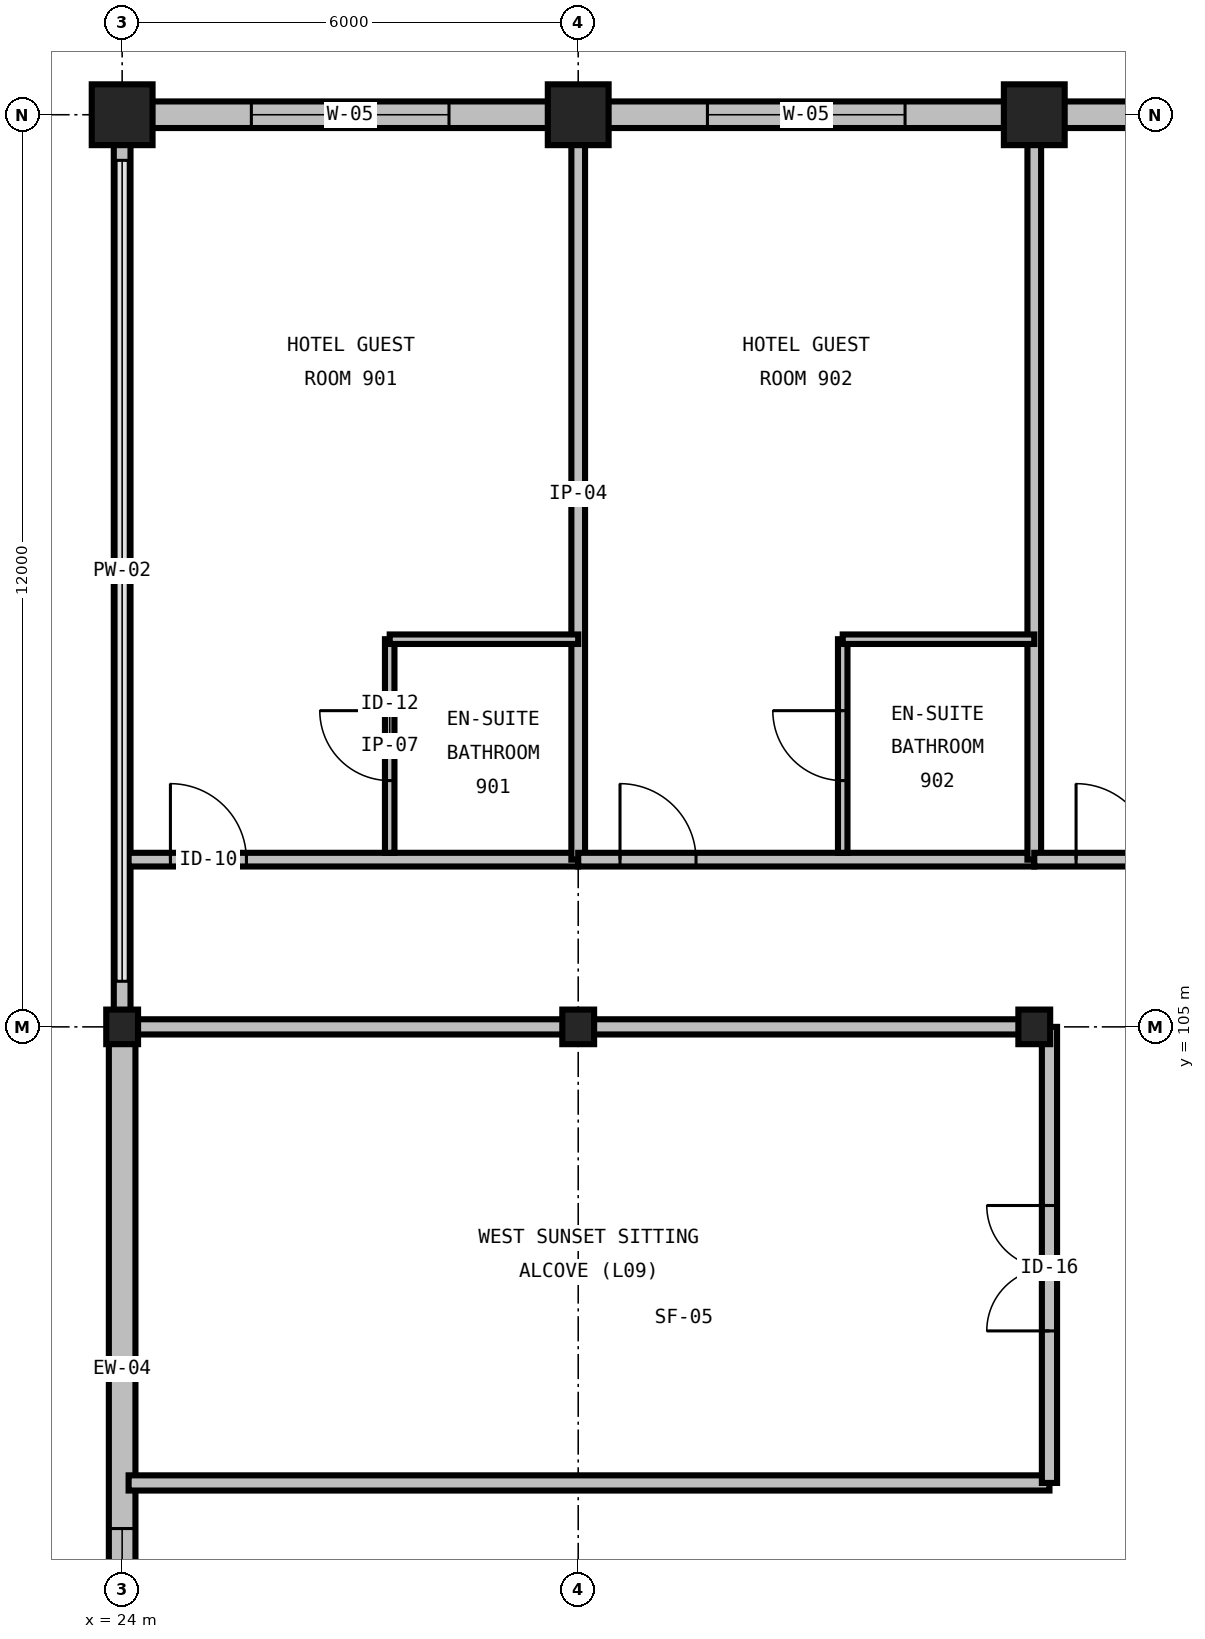
"""IFC4 building model, lengths in metres.
Left out: names, types, materials, properties, quantities, classifications, styles, units other than length and angle.
Written with IfcOpenShell. Run it as: python <this file> out.ifc"""

import sys

from ifc_helpers import new_model, si_unit, direction, frame, frame_2d, origin, origin_2d, place, context, subcontext, project, spatial, rectangle, i_section, extrude, element, fill, save


model = new_model("IFC4")
c1 = context("Model", 3, precision=1e-05, world=origin(), true_north=direction((0.0, 1.0)))
c2 = subcontext(c1, "Body", "Model", "MODEL_VIEW")
j1 = project(units=[si_unit("LENGTHUNIT", "METRE"), si_unit("PLANEANGLEUNIT", "RADIAN")], contexts=[c1])
p1 = place(None, origin())
s1 = spatial("IfcSite", under=j1, at=p1, CompositionType="ELEMENT")
p2 = place(p1, origin())
s2 = spatial("IfcBuilding", under=s1, at=p2, CompositionType="ELEMENT")
p3 = place(p2, frame((0.0, 0.0, 42.0)))
s3 = spatial("IfcBuildingStorey", under=s2, at=p3, CompositionType="ELEMENT", Elevation=42.0)
p4 = place(p3, frame((24.0, 105.0, 0.0), z_axis=(0.0, 0.0, 1.0), x_axis=(1.0, 0.0, 0.0)))
e1 = element("IfcColumn", 1, at=p4, inside=s3, PredefinedType="COLUMN", context=c2, shape_type="SweptSolid", body=[
    extrude(i_section(OverallWidth=0.419, OverallDepth=0.455, WebThickness=0.042, FlangeThickness=0.068, FilletRadius=0.031, at=origin_2d()), origin(), (0.0, 0.0, 1.0), 3.6),
])
p5 = place(p3, frame((24.0, 117.0, 0.0), z_axis=(0.0, 0.0, 1.0), x_axis=(1.0, 0.0, 0.0)))
e2 = element("IfcColumn", 2, at=p5, inside=s3, PredefinedType="COLUMN", context=c2, shape_type="SweptSolid", body=[
    extrude(rectangle(XDim=0.8, YDim=0.8, at=origin_2d()), origin(), (0.0, 0.0, 1.0), 3.6),
])
p6 = place(p3, frame((30.0, 105.0, 0.0), z_axis=(0.0, 0.0, 1.0), x_axis=(1.0, 0.0, 0.0)))
e3 = element("IfcColumn", 3, at=p6, inside=s3, PredefinedType="COLUMN", context=c2, shape_type="SweptSolid", body=[
    extrude(i_section(OverallWidth=0.419, OverallDepth=0.455, WebThickness=0.042, FlangeThickness=0.068, FilletRadius=0.031, at=origin_2d()), origin(), (0.0, 0.0, 1.0), 3.6),
])
p7 = place(p3, frame((30.0, 117.0, 0.0), z_axis=(0.0, 0.0, 1.0), x_axis=(1.0, 0.0, 0.0)))
e4 = element("IfcColumn", 4, at=p7, inside=s3, PredefinedType="COLUMN", context=c2, shape_type="SweptSolid", body=[
    extrude(rectangle(XDim=0.8, YDim=0.8, at=origin_2d()), origin(), (0.0, 0.0, 1.0), 3.6),
])
p8 = place(p3, frame((36.0, 105.0, 0.0), z_axis=(0.0, 0.0, 1.0), x_axis=(1.0, 0.0, 0.0)))
e5 = element("IfcColumn", 5, at=p8, inside=s3, PredefinedType="COLUMN", context=c2, shape_type="SweptSolid", body=[
    extrude(i_section(OverallWidth=0.419, OverallDepth=0.455, WebThickness=0.042, FlangeThickness=0.068, FilletRadius=0.031, at=origin_2d()), origin(), (0.0, 0.0, 1.0), 3.6),
])
p9 = place(p3, frame((36.0, 117.0, 0.0), z_axis=(0.0, 0.0, 1.0), x_axis=(1.0, 0.0, 0.0)))
e6 = element("IfcColumn", 6, at=p9, inside=s3, PredefinedType="COLUMN", context=c2, shape_type="SweptSolid", body=[
    extrude(rectangle(XDim=0.8, YDim=0.8, at=origin_2d()), origin(), (0.0, 0.0, 1.0), 3.6),
])
p10 = place(p3, frame((30.0, 117.0, 0.0), z_axis=(0.0, 0.0, 1.0), x_axis=(-1.0, 0.0, 0.0)))
e7 = element("IfcWall", 7, at=p10, inside=s3, PredefinedType="STANDARD", context=c2, shape_type="SweptSolid", body=[
    extrude(rectangle(XDim=6.0, YDim=0.35, at=frame_2d((3.0, 0.0))), origin(), (0.0, 0.0, 1.0), 2.486),
])
p11 = place(p10, frame((1.7, 0.0, 0.72)))
e8 = element("IfcOpeningElement", 8, at=p11, cuts=e7, PredefinedType="OPENING", context=c2, shape_type="SweptSolid", body=[
    extrude(rectangle(XDim=2.6, YDim=1.69, at=frame_2d((1.3, 0.845))), frame((0.0, 0.19, 0.0), z_axis=(0.0, -1.0, 0.0), x_axis=(1.0, 0.0, 0.0)), (0.0, 0.0, 1.0), 0.38),
])
p12 = place(p3, frame((36.0, 117.0, 0.0), z_axis=(0.0, 0.0, 1.0), x_axis=(-1.0, 0.0, 0.0)))
e9 = element("IfcWall", 9, at=p12, inside=s3, PredefinedType="STANDARD", context=c2, shape_type="SweptSolid", body=[
    extrude(rectangle(XDim=6.0, YDim=0.35, at=frame_2d((3.0, 0.0))), origin(), (0.0, 0.0, 1.0), 2.486),
])
p13 = place(p12, frame((1.7, 0.0, 0.72)))
e10 = element("IfcOpeningElement", 10, at=p13, cuts=e9, PredefinedType="OPENING", context=c2, shape_type="SweptSolid", body=[
    extrude(rectangle(XDim=2.6, YDim=1.69, at=frame_2d((1.3, 0.845))), frame((0.0, 0.19, 0.0), z_axis=(0.0, -1.0, 0.0), x_axis=(1.0, 0.0, 0.0)), (0.0, 0.0, 1.0), 0.38),
])
p14 = place(p3, frame((42.0, 117.0, 0.0), z_axis=(0.0, 0.0, 1.0), x_axis=(-1.0, 0.0, 0.0)))
e11 = element("IfcWall", 11, at=p14, inside=s3, PredefinedType="STANDARD", context=c2, shape_type="SweptSolid", body=[
    extrude(rectangle(XDim=6.0, YDim=0.35, at=frame_2d((3.0, 0.0))), origin(), (0.0, 0.0, 1.0), 2.486),
])
p15 = place(p14, frame((1.7, 0.0, 0.72)))
e12 = element("IfcOpeningElement", 12, at=p15, cuts=e11, PredefinedType="OPENING", context=c2, shape_type="SweptSolid", body=[
    extrude(rectangle(XDim=2.6, YDim=1.69, at=frame_2d((1.3, 0.845))), frame((0.0, 0.19, 0.0), z_axis=(0.0, -1.0, 0.0), x_axis=(1.0, 0.0, 0.0)), (0.0, 0.0, 1.0), 0.38),
])
p16 = place(p3, frame((24.0, 105.0, 0.0), z_axis=(0.0, 0.0, 1.0), x_axis=(0.0, -1.0, 0.0)))
e13 = element("IfcWall", 13, at=p16, inside=s3, PredefinedType="STANDARD", context=c2, shape_type="SweptSolid", body=[
    extrude(rectangle(XDim=9.0, YDim=0.35, at=frame_2d((4.5, 0.0))), origin(), (0.0, 0.0, 1.0), 2.981),
])
p17 = place(p16, frame((6.6, 0.0, 0.85)))
e14 = element("IfcOpeningElement", 14, at=p17, cuts=e13, PredefinedType="OPENING", context=c2, shape_type="SweptSolid", body=[
    extrude(rectangle(XDim=1.8, YDim=1.5, at=frame_2d((0.9, 0.75))), frame((0.0, 0.19, 0.0), z_axis=(0.0, -1.0, 0.0), x_axis=(1.0, 0.0, 0.0)), (0.0, 0.0, 1.0), 0.38),
])
p18 = place(p3, frame((24.0, 117.0, 0.0), z_axis=(0.0, 0.0, 1.0), x_axis=(0.0, -1.0, 0.0)))
e15 = element("IfcWall", 15, at=p18, inside=s3, PredefinedType="PARAPET", context=c2, shape_type="SweptSolid", body=[
    extrude(rectangle(XDim=12.0, YDim=0.22, at=frame_2d((6.0, 0.0))), origin(), (0.0, 0.0, 1.0), 0.2),
])
p19 = place(p3, frame((24.085, 107.2, 0.0), z_axis=(0.0, 0.0, 1.0), x_axis=(1.0, 0.0, 0.0)))
e16 = element("IfcWall", 16, at=p19, inside=s3, PredefinedType="PARTITIONING", context=c2, shape_type="SweptSolid", body=[
    extrude(rectangle(XDim=5.915, YDim=0.18, at=frame_2d((2.957, 0.0))), origin(), (0.0, 0.0, 1.0), 3.29),
])
p20 = place(p19, frame((0.55, 0.0, 0.0)))
e17 = element("IfcOpeningElement", 17, at=p20, cuts=e16, PredefinedType="OPENING", context=c2, shape_type="SweptSolid", body=[
    extrude(rectangle(XDim=1.0, YDim=2.15, at=frame_2d((0.5, 1.075))), frame((0.0, 0.105, 0.0), z_axis=(0.0, -1.0, 0.0), x_axis=(1.0, 0.0, 0.0)), (0.0, 0.0, 1.0), 0.21),
])
p21 = place(p3, frame((30.0, 107.2, 0.0), z_axis=(0.0, 0.0, 1.0), x_axis=(0.0, 1.0, 0.0)))
e18 = element("IfcWall", 18, at=p21, inside=s3, PredefinedType="PARTITIONING", context=c2, shape_type="SweptSolid", body=[
    extrude(rectangle(XDim=9.625, YDim=0.18, at=frame_2d((4.812, 0.0))), origin(), (0.0, 0.0, 1.0), 2.59),
])
p22 = place(p3, frame((27.52, 107.29, 0.0), z_axis=(0.0, 0.0, 1.0), x_axis=(0.0, 1.0, 0.0)))
e19 = element("IfcWall", 19, at=p22, inside=s3, PredefinedType="PARTITIONING", context=c2, shape_type="SweptSolid", body=[
    extrude(rectangle(XDim=2.81, YDim=0.125, at=frame_2d((1.405, 0.0))), origin(), (0.0, 0.0, 1.0), 3.29),
])
p23 = place(p22, frame((0.95, 0.0, 0.0)))
e20 = element("IfcOpeningElement", 20, at=p23, cuts=e19, PredefinedType="OPENING", context=c2, shape_type="SweptSolid", body=[
    extrude(rectangle(XDim=0.92, YDim=2.1, at=frame_2d((0.46, 1.05))), frame((0.0, 0.077, 0.0), z_axis=(0.0, -1.0, 0.0), x_axis=(1.0, 0.0, 0.0)), (0.0, 0.0, 1.0), 0.155),
])
p24 = place(p3, frame((27.52, 110.1, 0.0), z_axis=(0.0, 0.0, 1.0), x_axis=(1.0, 0.0, 0.0)))
e21 = element("IfcWall", 21, at=p24, inside=s3, PredefinedType="PARTITIONING", context=c2, shape_type="SweptSolid", body=[
    extrude(rectangle(XDim=2.48, YDim=0.125, at=frame_2d((1.24, 0.0))), origin(), (0.0, 0.0, 1.0), 3.29),
])
p25 = place(p3, frame((30.0, 107.2, 0.0), z_axis=(0.0, 0.0, 1.0), x_axis=(1.0, 0.0, 0.0)))
e22 = element("IfcWall", 22, at=p25, inside=s3, PredefinedType="PARTITIONING", context=c2, shape_type="SweptSolid", body=[
    extrude(rectangle(XDim=6.0, YDim=0.18, at=frame_2d((3.0, 0.0))), origin(), (0.0, 0.0, 1.0), 3.29),
])
p26 = place(p25, frame((0.55, 0.0, 0.0)))
e23 = element("IfcOpeningElement", 23, at=p26, cuts=e22, PredefinedType="OPENING", context=c2, shape_type="SweptSolid", body=[
    extrude(rectangle(XDim=1.0, YDim=2.15, at=frame_2d((0.5, 1.075))), frame((0.0, 0.105, 0.0), z_axis=(0.0, -1.0, 0.0), x_axis=(1.0, 0.0, 0.0)), (0.0, 0.0, 1.0), 0.21),
])
p27 = place(p3, frame((36.0, 107.2, 0.0), z_axis=(0.0, 0.0, 1.0), x_axis=(0.0, 1.0, 0.0)))
e24 = element("IfcWall", 24, at=p27, inside=s3, PredefinedType="PARTITIONING", context=c2, shape_type="SweptSolid", body=[
    extrude(rectangle(XDim=9.625, YDim=0.18, at=frame_2d((4.812, 0.0))), origin(), (0.0, 0.0, 1.0), 2.59),
])
p28 = place(p3, frame((33.48, 107.29, 0.0), z_axis=(0.0, 0.0, 1.0), x_axis=(0.0, 1.0, 0.0)))
e25 = element("IfcWall", 25, at=p28, inside=s3, PredefinedType="PARTITIONING", context=c2, shape_type="SweptSolid", body=[
    extrude(rectangle(XDim=2.81, YDim=0.125, at=frame_2d((1.405, 0.0))), origin(), (0.0, 0.0, 1.0), 3.29),
])
p29 = place(p28, frame((0.95, 0.0, 0.0)))
e26 = element("IfcOpeningElement", 26, at=p29, cuts=e25, PredefinedType="OPENING", context=c2, shape_type="SweptSolid", body=[
    extrude(rectangle(XDim=0.92, YDim=2.1, at=frame_2d((0.46, 1.05))), frame((0.0, 0.077, 0.0), z_axis=(0.0, -1.0, 0.0), x_axis=(1.0, 0.0, 0.0)), (0.0, 0.0, 1.0), 0.155),
])
p30 = place(p3, frame((33.48, 110.1, 0.0), z_axis=(0.0, 0.0, 1.0), x_axis=(1.0, 0.0, 0.0)))
e27 = element("IfcWall", 27, at=p30, inside=s3, PredefinedType="PARTITIONING", context=c2, shape_type="SweptSolid", body=[
    extrude(rectangle(XDim=2.52, YDim=0.125, at=frame_2d((1.26, 0.0))), origin(), (0.0, 0.0, 1.0), 3.29),
])
p31 = place(p3, frame((36.0, 107.2, 0.0), z_axis=(0.0, 0.0, 1.0), x_axis=(1.0, 0.0, 0.0)))
e28 = element("IfcWall", 28, at=p31, inside=s3, PredefinedType="PARTITIONING", context=c2, shape_type="SweptSolid", body=[
    extrude(rectangle(XDim=6.0, YDim=0.18, at=frame_2d((3.0, 0.0))), origin(), (0.0, 0.0, 1.0), 3.29),
])
p32 = place(p31, frame((0.55, 0.0, 0.0)))
e29 = element("IfcOpeningElement", 29, at=p32, cuts=e28, PredefinedType="OPENING", context=c2, shape_type="SweptSolid", body=[
    extrude(rectangle(XDim=1.0, YDim=2.15, at=frame_2d((0.5, 1.075))), frame((0.0, 0.105, 0.0), z_axis=(0.0, -1.0, 0.0), x_axis=(1.0, 0.0, 0.0)), (0.0, 0.0, 1.0), 0.21),
])
p33 = place(p3, frame((24.085, 99.0, 0.0), z_axis=(0.0, 0.0, 1.0), x_axis=(1.0, 0.0, 0.0)))
e30 = element("IfcWall", 30, at=p33, inside=s3, PredefinedType="PARTITIONING", context=c2, shape_type="SweptSolid", body=[
    extrude(rectangle(XDim=12.115, YDim=0.2, at=frame_2d((6.057, 0.0))), origin(), (0.0, 0.0, 1.0), 3.29),
])
p34 = place(p3, frame((36.2, 99.0, 0.0), z_axis=(0.0, 0.0, 1.0), x_axis=(0.0, 1.0, 0.0)))
e31 = element("IfcWall", 31, at=p34, inside=s3, PredefinedType="PARTITIONING", context=c2, shape_type="SweptSolid", body=[
    extrude(rectangle(XDim=6.0, YDim=0.2, at=frame_2d((3.0, 0.0))), origin(), (0.0, 0.0, 1.0), 3.29),
])
p35 = place(p34, frame((2.0, 0.0, 0.0)))
e32 = element("IfcOpeningElement", 32, at=p35, cuts=e31, PredefinedType="OPENING", context=c2, shape_type="SweptSolid", body=[
    extrude(rectangle(XDim=1.65, YDim=2.25, at=frame_2d((0.825, 1.125))), frame((0.0, 0.115, 0.0), z_axis=(0.0, -1.0, 0.0), x_axis=(1.0, 0.0, 0.0)), (0.0, 0.0, 1.0), 0.23),
])
p36 = place(p3, frame((36.2, 105.0, 0.0), z_axis=(0.0, 0.0, 1.0), x_axis=(-1.0, 0.0, 0.0)))
e33 = element("IfcWall", 33, at=p36, inside=s3, PredefinedType="PARTITIONING", context=c2, shape_type="SweptSolid", body=[
    extrude(rectangle(XDim=12.115, YDim=0.2, at=frame_2d((6.057, 0.0))), origin(), (0.0, 0.0, 1.0), 2.736),
])
p37 = place(p11, origin())
e34 = element("IfcWindow", 34, at=p37, inside=s3, PartitioningType="DOUBLE_PANEL_VERTICAL", PredefinedType="WINDOW", context=c2, shape_type="SweptSolid", body=[
    extrude(rectangle(XDim=2.6, YDim=1.69, at=frame_2d((1.3, 0.845))), frame((0.0, 0.03, 0.0), z_axis=(0.0, -1.0, 0.0), x_axis=(1.0, 0.0, 0.0)), (0.0, 0.0, 1.0), 0.06),
])
fill(e8, e34)
p38 = place(p13, origin())
e35 = element("IfcWindow", 35, at=p38, inside=s3, PartitioningType="DOUBLE_PANEL_VERTICAL", PredefinedType="WINDOW", context=c2, shape_type="SweptSolid", body=[
    extrude(rectangle(XDim=2.6, YDim=1.69, at=frame_2d((1.3, 0.845))), frame((0.0, 0.03, 0.0), z_axis=(0.0, -1.0, 0.0), x_axis=(1.0, 0.0, 0.0)), (0.0, 0.0, 1.0), 0.06),
])
fill(e10, e35)
p39 = place(p17, origin())
e36 = element("IfcWindow", 36, at=p39, inside=s3, PartitioningType="SINGLE_PANEL", PredefinedType="WINDOW", context=c2, shape_type="SweptSolid", body=[
    extrude(rectangle(XDim=1.8, YDim=1.5, at=frame_2d((0.9, 0.75))), frame((0.0, 0.03, 0.0), z_axis=(0.0, -1.0, 0.0), x_axis=(1.0, 0.0, 0.0)), (0.0, 0.0, 1.0), 0.06),
])
fill(e14, e36)
p40 = place(p20, origin())
e37 = element("IfcDoor", 37, at=p40, inside=s3, OperationType="SINGLE_SWING_LEFT", PredefinedType="DOOR", context=c2, shape_type="SweptSolid", body=[
    extrude(rectangle(XDim=1.0, YDim=2.15, at=frame_2d((0.5, 1.075))), frame((0.0, 0.025, 0.0), z_axis=(0.0, -1.0, 0.0), x_axis=(1.0, 0.0, 0.0)), (0.0, 0.0, 1.0), 0.05),
])
fill(e17, e37)
p41 = place(p23, origin())
e38 = element("IfcDoor", 38, at=p41, inside=s3, OperationType="SINGLE_SWING_RIGHT", PredefinedType="DOOR", context=c2, shape_type="SweptSolid", body=[
    extrude(rectangle(XDim=0.92, YDim=2.1, at=frame_2d((0.46, 1.05))), frame((0.0, 0.025, 0.0), z_axis=(0.0, -1.0, 0.0), x_axis=(1.0, 0.0, 0.0)), (0.0, 0.0, 1.0), 0.05),
])
fill(e20, e38)
p42 = place(p26, origin())
e39 = element("IfcDoor", 39, at=p42, inside=s3, OperationType="SINGLE_SWING_LEFT", PredefinedType="DOOR", context=c2, shape_type="SweptSolid", body=[
    extrude(rectangle(XDim=1.0, YDim=2.15, at=frame_2d((0.5, 1.075))), frame((0.0, 0.025, 0.0), z_axis=(0.0, -1.0, 0.0), x_axis=(1.0, 0.0, 0.0)), (0.0, 0.0, 1.0), 0.05),
])
fill(e23, e39)
p43 = place(p29, origin())
e40 = element("IfcDoor", 40, at=p43, inside=s3, OperationType="SINGLE_SWING_RIGHT", PredefinedType="DOOR", context=c2, shape_type="SweptSolid", body=[
    extrude(rectangle(XDim=0.92, YDim=2.1, at=frame_2d((0.46, 1.05))), frame((0.0, 0.025, 0.0), z_axis=(0.0, -1.0, 0.0), x_axis=(1.0, 0.0, 0.0)), (0.0, 0.0, 1.0), 0.05),
])
fill(e26, e40)
p44 = place(p32, origin())
e41 = element("IfcDoor", 41, at=p44, inside=s3, OperationType="SINGLE_SWING_LEFT", PredefinedType="DOOR", context=c2, shape_type="SweptSolid", body=[
    extrude(rectangle(XDim=1.0, YDim=2.15, at=frame_2d((0.5, 1.075))), frame((0.0, 0.025, 0.0), z_axis=(0.0, -1.0, 0.0), x_axis=(1.0, 0.0, 0.0)), (0.0, 0.0, 1.0), 0.05),
])
fill(e29, e41)
p45 = place(p35, origin())
e42 = element("IfcDoor", 42, at=p45, inside=s3, OperationType="DOUBLE_DOOR_SINGLE_SWING", PredefinedType="DOOR", context=c2, shape_type="SweptSolid", body=[
    extrude(rectangle(XDim=1.65, YDim=2.25, at=frame_2d((0.825, 1.125))), frame((0.0, 0.025, 0.0), z_axis=(0.0, -1.0, 0.0), x_axis=(1.0, 0.0, 0.0)), (0.0, 0.0, 1.0), 0.05),
])
fill(e32, e42)
save(model, sys.argv[1])
